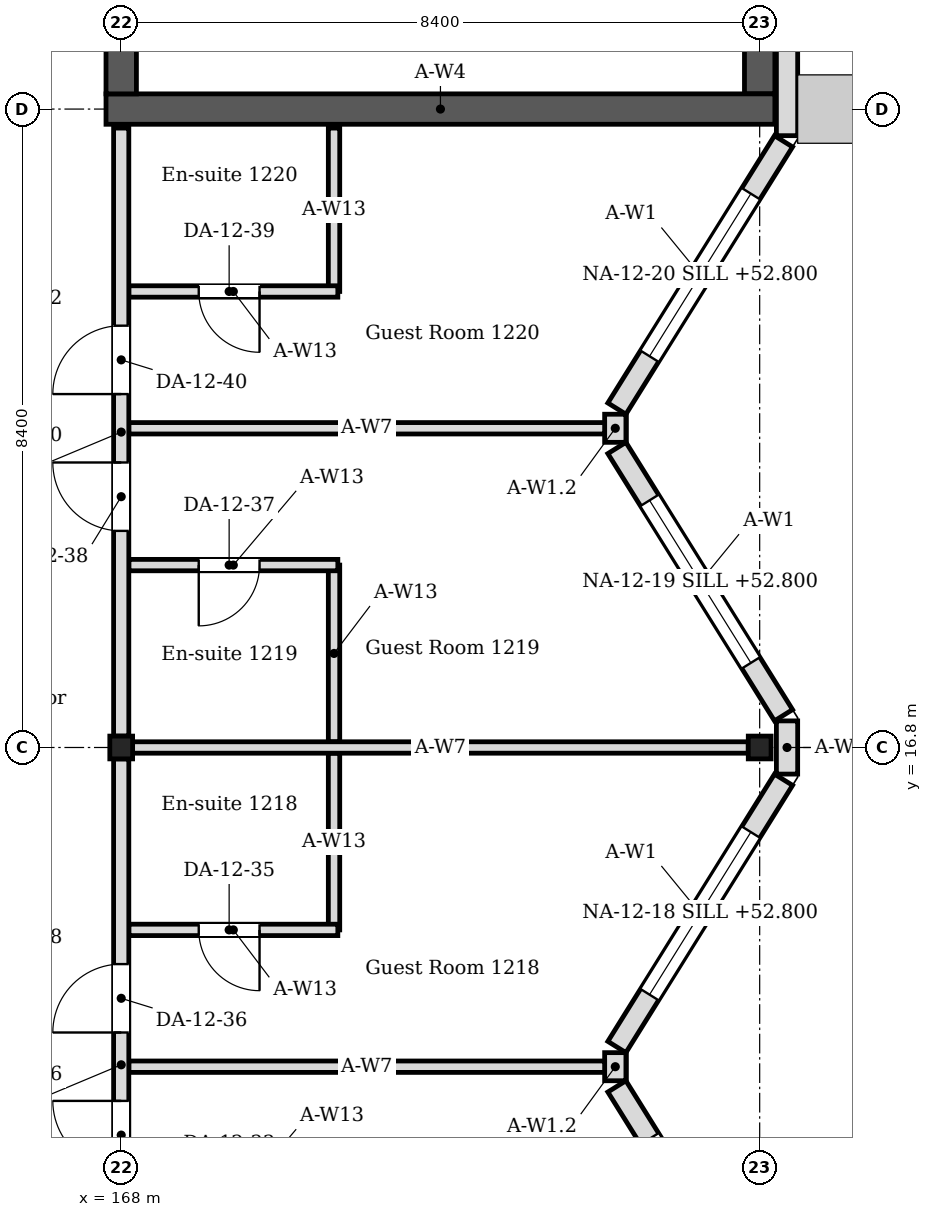
"""IFC4 building model, lengths in metres.
Left out: names, types, materials, properties, quantities, classifications, styles, units other than length and angle.
Written with IfcOpenShell. Run it as: python <this file> out.ifc"""

import sys

from ifc_helpers import new_model, si_unit, direction, frame, frame_2d, origin, origin_2d, place, context, subcontext, project, spatial, rectangle, i_section, extrude, element, fill, save


model = new_model("IFC4")
c1 = context("Model", 3, precision=1e-05, world=origin(), true_north=direction((0.0, 1.0)))
c2 = subcontext(c1, "Body", "Model", "MODEL_VIEW")
j1 = project(units=[si_unit("LENGTHUNIT", "METRE"), si_unit("PLANEANGLEUNIT", "RADIAN")], contexts=[c1])
p1 = place(None, origin())
s1 = spatial("IfcSite", under=j1, at=p1, CompositionType="ELEMENT")
p2 = place(p1, origin())
s2 = spatial("IfcBuilding", under=s1, at=p2, CompositionType="ELEMENT")
p3 = place(p2, frame((0.0, 0.0, 52.2)))
s3 = spatial("IfcBuildingStorey", under=s2, at=p3, CompositionType="ELEMENT", Elevation=52.2)
for number, where, z_axis, x_axis in (
    (1, (168.0, 16.8, 0.0), (0.0, 0.0, 1.0), (1.0, 0.0, 0.0)),
    (2, (176.4, 16.8, 0.0), (0.0, 0.0, 1.0), (1.0, 0.0, 0.0)),
):
    element("IfcColumn", number, at=place(p3, frame(where, z_axis=z_axis, x_axis=x_axis)), inside=s3, PredefinedType="COLUMN", context=c2, shape_type="SweptSolid", body=[
        extrude(i_section(OverallWidth=0.3, OverallDepth=0.3, WebThickness=0.01, FlangeThickness=0.015, FilletRadius=0.013, at=origin_2d()), origin(), (0.0, 0.0, 1.0), 4.2),
    ])
p4 = place(p3, frame((167.8, 25.2, 0.0), z_axis=(0.0, 0.0, 1.0), x_axis=(1.0, 0.0, 0.0)))
e3 = element("IfcWall", 3, at=p4, inside=s3, PredefinedType="SOLIDWALL", context=c2, shape_type="SweptSolid", body=[
    extrude(rectangle(XDim=8.8, YDim=0.4, at=frame_2d((4.4, 0.0))), origin(), (0.0, 0.0, 1.0), 4.05),
])
p5 = place(p3, frame((168.0, 25.4, 0.0), z_axis=(0.0, 0.0, 1.0), x_axis=(0.0, 1.0, 0.0)))
e4 = element("IfcWall", 4, at=p5, inside=s3, PredefinedType="SOLIDWALL", context=c2, shape_type="SweptSolid", body=[
    extrude(rectangle(XDim=16.4, YDim=0.4, at=frame_2d((8.2, 0.0))), origin(), (0.0, 0.0, 1.0), 4.05),
])
p6 = place(p5, frame((1.0, 0.0, 0.0)))
e5 = element("IfcOpeningElement", 5, at=p6, cuts=e4, PredefinedType="OPENING", context=c2, shape_type="SweptSolid", body=[
    extrude(rectangle(XDim=1.0, YDim=2.1, at=frame_2d((0.5, 1.05))), frame((0.0, 0.21, 0.0), z_axis=(0.0, -1.0, 0.0), x_axis=(1.0, 0.0, 0.0)), (0.0, 0.0, 1.0), 0.42),
])
p7 = place(p5, frame((14.4, 0.0, 0.0)))
e6 = element("IfcOpeningElement", 6, at=p7, cuts=e4, PredefinedType="OPENING", context=c2, shape_type="SweptSolid", body=[
    extrude(rectangle(XDim=1.4, YDim=2.1, at=frame_2d((0.7, 1.05))), frame((0.0, 0.21, 0.0), z_axis=(0.0, -1.0, 0.0), x_axis=(1.0, 0.0, 0.0)), (0.0, 0.0, 1.0), 0.42),
])
p8 = place(p3, frame((176.4, 25.4, 0.0), z_axis=(0.0, 0.0, 1.0), x_axis=(0.0, 1.0, 0.0)))
e7 = element("IfcWall", 7, at=p8, inside=s3, PredefinedType="SOLIDWALL", context=c2, shape_type="SweptSolid", body=[
    extrude(rectangle(XDim=16.4, YDim=0.4, at=frame_2d((8.2, 0.0))), origin(), (0.0, 0.0, 1.0), 4.05),
])
p9 = place(p3, frame((176.714, 8.824, 0.0), z_axis=(0.0, 0.0, 1.0), x_axis=(-0.529018946142, 0.848610013271, 0.0)))
e8 = element("IfcWall", 8, at=p9, inside=s3, PredefinedType="SOLIDWALL", context=c2, shape_type="SweptSolid", body=[
    extrude(rectangle(XDim=4.144, YDim=0.28, at=frame_2d((2.072, 0.0))), origin(), (0.0, 0.0, 1.0), 4.05),
])
p10 = place(p9, frame((0.812, 0.0, 0.6)))
e9 = element("IfcOpeningElement", 9, at=p10, cuts=e8, PredefinedType="OPENING", context=c2, shape_type="SweptSolid", body=[
    extrude(rectangle(XDim=2.52, YDim=2.4, at=frame_2d((1.26, 1.2))), frame((0.0, 0.15, 0.0), z_axis=(0.0, -1.0, 0.0), x_axis=(1.0, 0.0, 0.0)), (0.0, 0.0, 1.0), 0.3),
])
p11 = place(p3, frame((174.521, 12.859, 0.0), z_axis=(0.0, 0.0, 1.0), x_axis=(0.528992500338, 0.848626498871, 0.0)))
e10 = element("IfcWall", 10, at=p11, inside=s3, PredefinedType="SOLIDWALL", context=c2, shape_type="SweptSolid", body=[
    extrude(rectangle(XDim=4.145, YDim=0.28, at=frame_2d((2.072, 0.0))), origin(), (0.0, 0.0, 1.0), 4.05),
])
p12 = place(p11, frame((0.812, 0.0, 0.6)))
e11 = element("IfcOpeningElement", 11, at=p12, cuts=e10, PredefinedType="OPENING", context=c2, shape_type="SweptSolid", body=[
    extrude(rectangle(XDim=2.52, YDim=2.4, at=frame_2d((1.26, 1.2))), frame((0.0, 0.15, 0.0), z_axis=(0.0, -1.0, 0.0), x_axis=(1.0, 0.0, 0.0)), (0.0, 0.0, 1.0), 0.3),
])
p13 = place(p3, frame((174.5, 12.415, 0.0), z_axis=(0.0, 0.0, 1.0), x_axis=(0.0, 1.0, 0.0)))
e12 = element("IfcWall", 12, at=p13, inside=s3, PredefinedType="SOLIDWALL", context=c2, shape_type="SweptSolid", body=[
    extrude(rectangle(XDim=0.37, YDim=0.28, at=frame_2d((0.185, 0.0))), origin(), (0.0, 0.0, 1.0), 3.604),
])
p14 = place(p3, frame((176.76, 16.45, 0.0), z_axis=(0.0, 0.0, 1.0), x_axis=(0.0, 1.0, 0.0)))
e13 = element("IfcWall", 13, at=p14, inside=s3, PredefinedType="SOLIDWALL", context=c2, shape_type="SweptSolid", body=[
    extrude(rectangle(XDim=0.7, YDim=0.28, at=frame_2d((0.35, 0.0))), origin(), (0.0, 0.0, 1.0), 4.05),
])
p15 = place(p3, frame((176.714, 17.224, 0.0), z_axis=(0.0, 0.0, 1.0), x_axis=(-0.529018946142, 0.848610013271, 0.0)))
e14 = element("IfcWall", 14, at=p15, inside=s3, PredefinedType="SOLIDWALL", context=c2, shape_type="SweptSolid", body=[
    extrude(rectangle(XDim=4.144, YDim=0.28, at=frame_2d((2.072, 0.0))), origin(), (0.0, 0.0, 1.0), 4.05),
])
p16 = place(p15, frame((0.812, 0.0, 0.6)))
e15 = element("IfcOpeningElement", 15, at=p16, cuts=e14, PredefinedType="OPENING", context=c2, shape_type="SweptSolid", body=[
    extrude(rectangle(XDim=2.52, YDim=2.4, at=frame_2d((1.26, 1.2))), frame((0.0, 0.15, 0.0), z_axis=(0.0, -1.0, 0.0), x_axis=(1.0, 0.0, 0.0)), (0.0, 0.0, 1.0), 0.3),
])
p17 = place(p3, frame((174.521, 21.259, 0.0), z_axis=(0.0, 0.0, 1.0), x_axis=(0.529018946142, 0.848610013271, 0.0)))
e16 = element("IfcWall", 16, at=p17, inside=s3, PredefinedType="SOLIDWALL", context=c2, shape_type="SweptSolid", body=[
    extrude(rectangle(XDim=4.144, YDim=0.28, at=frame_2d((2.072, 0.0))), origin(), (0.0, 0.0, 1.0), 4.05),
])
p18 = place(p17, frame((0.812, 0.0, 0.6)))
e17 = element("IfcOpeningElement", 17, at=p18, cuts=e16, PredefinedType="OPENING", context=c2, shape_type="SweptSolid", body=[
    extrude(rectangle(XDim=2.52, YDim=2.4, at=frame_2d((1.26, 1.2))), frame((0.0, 0.15, 0.0), z_axis=(0.0, -1.0, 0.0), x_axis=(1.0, 0.0, 0.0)), (0.0, 0.0, 1.0), 0.3),
])
p19 = place(p3, frame((174.5, 20.815, 0.0), z_axis=(0.0, 0.0, 1.0), x_axis=(0.0, 1.0, 0.0)))
e18 = element("IfcWall", 18, at=p19, inside=s3, PredefinedType="SOLIDWALL", context=c2, shape_type="SweptSolid", body=[
    extrude(rectangle(XDim=0.37, YDim=0.28, at=frame_2d((0.185, 0.0))), origin(), (0.0, 0.0, 1.0), 3.604),
])
p20 = place(p3, frame((176.76, 24.85, 0.0), z_axis=(0.0, 0.0, 1.0), x_axis=(0.0, 1.0, 0.0)))
e19 = element("IfcWall", 19, at=p20, inside=s3, PredefinedType="SOLIDWALL", context=c2, shape_type="SweptSolid", body=[
    extrude(rectangle(XDim=42.57, YDim=0.28, at=frame_2d((21.285, 0.0))), origin(), (0.0, 0.0, 1.0), 4.05),
])
p21 = place(p20, frame((17.99, 0.0, 0.6)))
e20 = element("IfcOpeningElement", 20, at=p21, cuts=e19, PredefinedType="OPENING", context=c2, shape_type="SweptSolid", body=[
    extrude(rectangle(XDim=2.52, YDim=2.4, at=frame_2d((1.26, 1.2))), frame((0.0, 0.15, 0.0), z_axis=(0.0, -1.0, 0.0), x_axis=(1.0, 0.0, 0.0)), (0.0, 0.0, 1.0), 0.3),
])
p22 = place(p20, frame((22.19, 0.0, 0.6)))
e21 = element("IfcOpeningElement", 21, at=p22, cuts=e19, PredefinedType="OPENING", context=c2, shape_type="SweptSolid", body=[
    extrude(rectangle(XDim=2.52, YDim=2.4, at=frame_2d((1.26, 1.2))), frame((0.0, 0.15, 0.0), z_axis=(0.0, -1.0, 0.0), x_axis=(1.0, 0.0, 0.0)), (0.0, 0.0, 1.0), 0.3),
])
p23 = place(p20, frame((25.97, 0.0, 0.6)))
e22 = element("IfcOpeningElement", 22, at=p23, cuts=e19, PredefinedType="OPENING", context=c2, shape_type="SweptSolid", body=[
    extrude(rectangle(XDim=2.52, YDim=2.4, at=frame_2d((1.26, 1.2))), frame((0.0, 0.15, 0.0), z_axis=(0.0, -1.0, 0.0), x_axis=(1.0, 0.0, 0.0)), (0.0, 0.0, 1.0), 0.3),
])
p24 = place(p20, frame((30.17, 0.0, 0.45)))
e23 = element("IfcOpeningElement", 23, at=p24, cuts=e19, PredefinedType="OPENING", context=c2, shape_type="SweptSolid", body=[
    extrude(rectangle(XDim=2.52, YDim=2.1, at=frame_2d((1.26, 1.05))), frame((0.0, 0.15, 0.0), z_axis=(0.0, -1.0, 0.0), x_axis=(1.0, 0.0, 0.0)), (0.0, 0.0, 1.0), 0.3),
])
p25 = place(p3, frame((170.8, 14.4, 0.0), z_axis=(0.0, 0.0, 1.0), x_axis=(0.0, 1.0, 0.0)))
e24 = element("IfcWall", 24, at=p25, inside=s3, PredefinedType="PARTITIONING", context=c2, shape_type="SweptSolid", body=[
    extrude(rectangle(XDim=2.325, YDim=0.15, at=frame_2d((1.163, 0.0))), origin(), (0.0, 0.0, 1.0), 4.05),
])
p26 = place(p3, frame((170.85, 14.4, 0.0), z_axis=(0.0, 0.0, 1.0), x_axis=(-1.0, 0.0, 0.0)))
e25 = element("IfcWall", 25, at=p26, inside=s3, PredefinedType="PARTITIONING", context=c2, shape_type="SweptSolid", body=[
    extrude(rectangle(XDim=2.75, YDim=0.15, at=frame_2d((1.375, 0.0))), origin(), (0.0, 0.0, 1.0), 4.05),
])
p27 = place(p26, frame((1.03, 0.0, 0.0)))
e26 = element("IfcOpeningElement", 26, at=p27, cuts=e25, PredefinedType="OPENING", context=c2, shape_type="SweptSolid", body=[
    extrude(rectangle(XDim=0.8, YDim=2.1, at=frame_2d((0.4, 1.05))), frame((0.0, 0.085, 0.0), z_axis=(0.0, -1.0, 0.0), x_axis=(1.0, 0.0, 0.0)), (0.0, 0.0, 1.0), 0.17),
])
p28 = place(p3, frame((170.8, 16.875, 0.0), z_axis=(0.0, 0.0, 1.0), x_axis=(0.0, 1.0, 0.0)))
e27 = element("IfcWall", 27, at=p28, inside=s3, PredefinedType="PARTITIONING", context=c2, shape_type="SweptSolid", body=[
    extrude(rectangle(XDim=2.325, YDim=0.15, at=frame_2d((1.163, 0.0))), origin(), (0.0, 0.0, 1.0), 4.05),
])
p29 = place(p3, frame((170.85, 19.2, 0.0), z_axis=(0.0, 0.0, 1.0), x_axis=(-1.0, 0.0, 0.0)))
e28 = element("IfcWall", 28, at=p29, inside=s3, PredefinedType="PARTITIONING", context=c2, shape_type="SweptSolid", body=[
    extrude(rectangle(XDim=2.75, YDim=0.15, at=frame_2d((1.375, 0.0))), origin(), (0.0, 0.0, 1.0), 4.05),
])
p30 = place(p29, frame((1.03, 0.0, 0.0)))
e29 = element("IfcOpeningElement", 29, at=p30, cuts=e28, PredefinedType="OPENING", context=c2, shape_type="SweptSolid", body=[
    extrude(rectangle(XDim=0.8, YDim=2.1, at=frame_2d((0.4, 1.05))), frame((0.0, 0.085, 0.0), z_axis=(0.0, -1.0, 0.0), x_axis=(1.0, 0.0, 0.0)), (0.0, 0.0, 1.0), 0.17),
])
p31 = place(p3, frame((170.8, 22.8, 0.0), z_axis=(0.0, 0.0, 1.0), x_axis=(0.0, 1.0, 0.0)))
e30 = element("IfcWall", 30, at=p31, inside=s3, PredefinedType="PARTITIONING", context=c2, shape_type="SweptSolid", body=[
    extrude(rectangle(XDim=2.15, YDim=0.15, at=frame_2d((1.075, 0.0))), origin(), (0.0, 0.0, 1.0), 4.05),
])
p32 = place(p3, frame((170.85, 22.8, 0.0), z_axis=(0.0, 0.0, 1.0), x_axis=(-1.0, 0.0, 0.0)))
e31 = element("IfcWall", 31, at=p32, inside=s3, PredefinedType="PARTITIONING", context=c2, shape_type="SweptSolid", body=[
    extrude(rectangle(XDim=2.75, YDim=0.15, at=frame_2d((1.375, 0.0))), origin(), (0.0, 0.0, 1.0), 4.05),
])
p33 = place(p32, frame((1.03, 0.0, 0.0)))
e32 = element("IfcOpeningElement", 32, at=p33, cuts=e31, PredefinedType="OPENING", context=c2, shape_type="SweptSolid", body=[
    extrude(rectangle(XDim=0.8, YDim=2.1, at=frame_2d((0.4, 1.05))), frame((0.0, 0.085, 0.0), z_axis=(0.0, -1.0, 0.0), x_axis=(1.0, 0.0, 0.0)), (0.0, 0.0, 1.0), 0.17),
])
p34 = place(p3, frame((168.15, 16.8, 0.0), z_axis=(0.0, 0.0, 1.0), x_axis=(1.0, 0.0, 0.0)))
e33 = element("IfcWall", 33, at=p34, inside=s3, PredefinedType="PARTITIONING", context=c2, shape_type="SweptSolid", body=[
    extrude(rectangle(XDim=8.1, YDim=0.15, at=frame_2d((4.05, 0.0))), origin(), (0.0, 0.0, 1.0), 3.604),
])
for number, where, z_axis, x_axis in (
    (34, (168.1, 12.6, 0.0), (0.0, 0.0, 1.0), (1.0, 0.0, 0.0)),
    (35, (168.1, 21.0, 0.0), (0.0, 0.0, 1.0), (1.0, 0.0, 0.0)),
):
    element("IfcWall", number, at=place(p3, frame(where, z_axis=z_axis, x_axis=x_axis)), inside=s3, PredefinedType="PARTITIONING", context=c2, shape_type="SweptSolid", body=[
        extrude(rectangle(XDim=6.26, YDim=0.15, at=frame_2d((3.13, 0.0))), origin(), (0.0, 0.0, 1.0), 3.604),
    ])
p35 = place(p3, frame((168.0, 8.6, 0.0), z_axis=(0.0, 0.0, 1.0), x_axis=(0.0, 1.0, 0.0)))
e36 = element("IfcWall", 36, at=p35, inside=s3, PredefinedType="PARTITIONING", context=c2, shape_type="SweptSolid", body=[
    extrude(rectangle(XDim=8.05, YDim=0.2, at=frame_2d((4.025, 0.0))), origin(), (0.0, 0.0, 1.0), 3.45),
])
p36 = place(p35, frame((2.65, 0.0, 0.0)))
e37 = element("IfcOpeningElement", 37, at=p36, cuts=e36, PredefinedType="OPENING", context=c2, shape_type="SweptSolid", body=[
    extrude(rectangle(XDim=0.9, YDim=2.1, at=frame_2d((0.45, 1.05))), frame((0.0, 0.11, 0.0), z_axis=(0.0, -1.0, 0.0), x_axis=(1.0, 0.0, 0.0)), (0.0, 0.0, 1.0), 0.22),
])
p37 = place(p35, frame((4.45, 0.0, 0.0)))
e38 = element("IfcOpeningElement", 38, at=p37, cuts=e36, PredefinedType="OPENING", context=c2, shape_type="SweptSolid", body=[
    extrude(rectangle(XDim=0.9, YDim=2.1, at=frame_2d((0.45, 1.05))), frame((0.0, 0.11, 0.0), z_axis=(0.0, -1.0, 0.0), x_axis=(1.0, 0.0, 0.0)), (0.0, 0.0, 1.0), 0.22),
])
p38 = place(p3, frame((168.0, 16.95, 0.0), z_axis=(0.0, 0.0, 1.0), x_axis=(0.0, 1.0, 0.0)))
e39 = element("IfcWall", 39, at=p38, inside=s3, PredefinedType="PARTITIONING", context=c2, shape_type="SweptSolid", body=[
    extrude(rectangle(XDim=8.0, YDim=0.2, at=frame_2d((4.0, 0.0))), origin(), (0.0, 0.0, 1.0), 3.45),
])
p39 = place(p38, frame((2.7, 0.0, 0.0)))
e40 = element("IfcOpeningElement", 40, at=p39, cuts=e39, PredefinedType="OPENING", context=c2, shape_type="SweptSolid", body=[
    extrude(rectangle(XDim=0.9, YDim=2.1, at=frame_2d((0.45, 1.05))), frame((0.0, 0.11, 0.0), z_axis=(0.0, -1.0, 0.0), x_axis=(1.0, 0.0, 0.0)), (0.0, 0.0, 1.0), 0.22),
])
p40 = place(p38, frame((4.5, 0.0, 0.0)))
e41 = element("IfcOpeningElement", 41, at=p40, cuts=e39, PredefinedType="OPENING", context=c2, shape_type="SweptSolid", body=[
    extrude(rectangle(XDim=0.9, YDim=2.1, at=frame_2d((0.45, 1.05))), frame((0.0, 0.11, 0.0), z_axis=(0.0, -1.0, 0.0), x_axis=(1.0, 0.0, 0.0)), (0.0, 0.0, 1.0), 0.22),
])
p41 = place(p12, origin())
e42 = element("IfcWindow", 42, at=p41, inside=s3, PartitioningType="SINGLE_PANEL", PredefinedType="WINDOW", context=c2, shape_type="SweptSolid", body=[
    extrude(rectangle(XDim=2.52, YDim=2.4, at=frame_2d((1.26, 1.2))), frame((0.0, 0.03, 0.0), z_axis=(0.0, -1.0, 0.0), x_axis=(1.0, 0.0, 0.0)), (0.0, 0.0, 1.0), 0.06),
])
fill(e11, e42)
p42 = place(p16, origin())
e43 = element("IfcWindow", 43, at=p42, inside=s3, PartitioningType="SINGLE_PANEL", PredefinedType="WINDOW", context=c2, shape_type="SweptSolid", body=[
    extrude(rectangle(XDim=2.52, YDim=2.4, at=frame_2d((1.26, 1.2))), frame((0.0, 0.03, 0.0), z_axis=(0.0, -1.0, 0.0), x_axis=(1.0, 0.0, 0.0)), (0.0, 0.0, 1.0), 0.06),
])
fill(e15, e43)
p43 = place(p18, origin())
e44 = element("IfcWindow", 44, at=p43, inside=s3, PartitioningType="SINGLE_PANEL", PredefinedType="WINDOW", context=c2, shape_type="SweptSolid", body=[
    extrude(rectangle(XDim=2.52, YDim=2.4, at=frame_2d((1.26, 1.2))), frame((0.0, 0.03, 0.0), z_axis=(0.0, -1.0, 0.0), x_axis=(1.0, 0.0, 0.0)), (0.0, 0.0, 1.0), 0.06),
])
fill(e17, e44)
p44 = place(p36, origin())
e45 = element("IfcDoor", 45, at=p44, inside=s3, OperationType="SINGLE_SWING_RIGHT", PredefinedType="DOOR", context=c2, shape_type="SweptSolid", body=[
    extrude(rectangle(XDim=0.9, YDim=2.1, at=frame_2d((0.45, 1.05))), frame((0.0, 0.025, 0.0), z_axis=(0.0, -1.0, 0.0), x_axis=(1.0, 0.0, 0.0)), (0.0, 0.0, 1.0), 0.05),
])
fill(e37, e45)
p45 = place(p27, origin())
e46 = element("IfcDoor", 46, at=p45, inside=s3, OperationType="SINGLE_SWING_LEFT", PredefinedType="DOOR", context=c2, shape_type="SweptSolid", body=[
    extrude(rectangle(XDim=0.8, YDim=2.1, at=frame_2d((0.4, 1.05))), frame((0.0, 0.025, 0.0), z_axis=(0.0, -1.0, 0.0), x_axis=(1.0, 0.0, 0.0)), (0.0, 0.0, 1.0), 0.05),
])
fill(e26, e46)
p46 = place(p37, origin())
e47 = element("IfcDoor", 47, at=p46, inside=s3, OperationType="SINGLE_SWING_LEFT", PredefinedType="DOOR", context=c2, shape_type="SweptSolid", body=[
    extrude(rectangle(XDim=0.9, YDim=2.1, at=frame_2d((0.45, 1.05))), frame((0.0, 0.025, 0.0), z_axis=(0.0, -1.0, 0.0), x_axis=(1.0, 0.0, 0.0)), (0.0, 0.0, 1.0), 0.05),
])
fill(e38, e47)
p47 = place(p30, origin())
e48 = element("IfcDoor", 48, at=p47, inside=s3, OperationType="SINGLE_SWING_RIGHT", PredefinedType="DOOR", context=c2, shape_type="SweptSolid", body=[
    extrude(rectangle(XDim=0.8, YDim=2.1, at=frame_2d((0.4, 1.05))), frame((0.0, 0.025, 0.0), z_axis=(0.0, -1.0, 0.0), x_axis=(1.0, 0.0, 0.0)), (0.0, 0.0, 1.0), 0.05),
])
fill(e29, e48)
p48 = place(p39, origin())
e49 = element("IfcDoor", 49, at=p48, inside=s3, OperationType="SINGLE_SWING_RIGHT", PredefinedType="DOOR", context=c2, shape_type="SweptSolid", body=[
    extrude(rectangle(XDim=0.9, YDim=2.1, at=frame_2d((0.45, 1.05))), frame((0.0, 0.025, 0.0), z_axis=(0.0, -1.0, 0.0), x_axis=(1.0, 0.0, 0.0)), (0.0, 0.0, 1.0), 0.05),
])
fill(e40, e49)
p49 = place(p33, origin())
e50 = element("IfcDoor", 50, at=p49, inside=s3, OperationType="SINGLE_SWING_LEFT", PredefinedType="DOOR", context=c2, shape_type="SweptSolid", body=[
    extrude(rectangle(XDim=0.8, YDim=2.1, at=frame_2d((0.4, 1.05))), frame((0.0, 0.025, 0.0), z_axis=(0.0, -1.0, 0.0), x_axis=(1.0, 0.0, 0.0)), (0.0, 0.0, 1.0), 0.05),
])
fill(e32, e50)
p50 = place(p40, origin())
e51 = element("IfcDoor", 51, at=p50, inside=s3, OperationType="SINGLE_SWING_LEFT", PredefinedType="DOOR", context=c2, shape_type="SweptSolid", body=[
    extrude(rectangle(XDim=0.9, YDim=2.1, at=frame_2d((0.45, 1.05))), frame((0.0, 0.025, 0.0), z_axis=(0.0, -1.0, 0.0), x_axis=(1.0, 0.0, 0.0)), (0.0, 0.0, 1.0), 0.05),
])
fill(e41, e51)
save(model, sys.argv[1])
